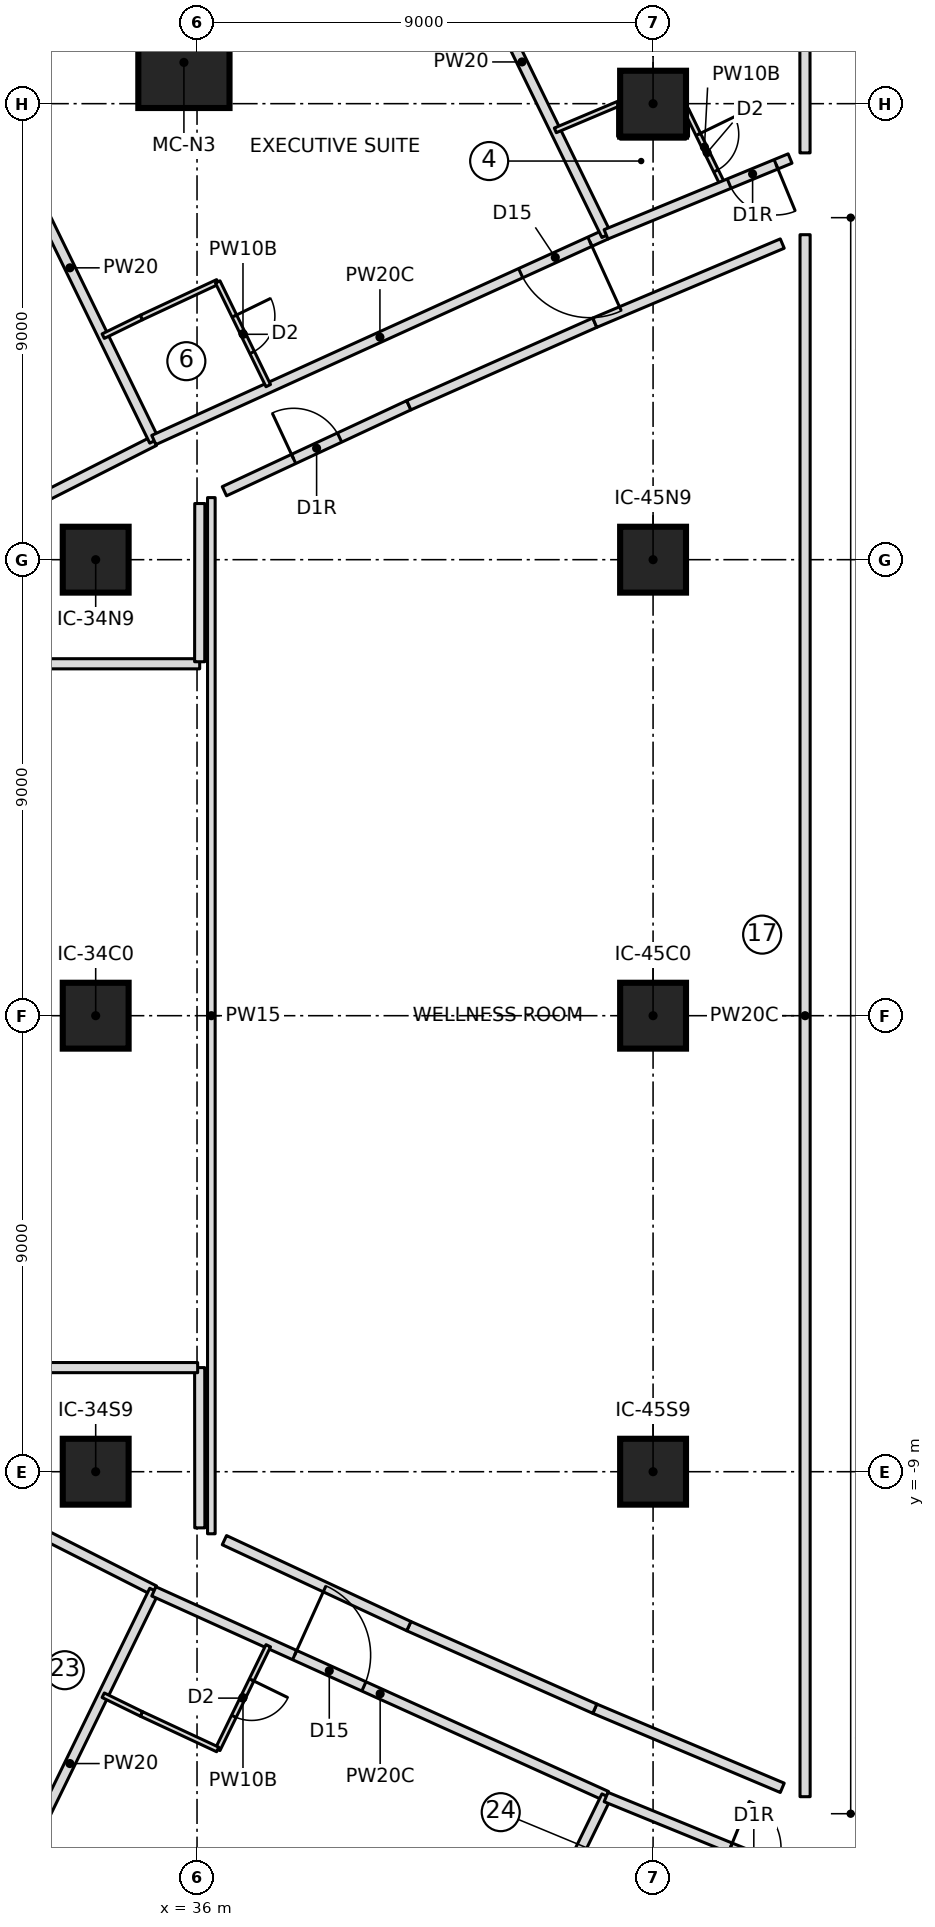
"""IFC4 building model, lengths in metres.
Left out: names, types, materials, properties, quantities, classifications, styles, units other than length and angle.
Written with IfcOpenShell. Run it as: python <this file> out.ifc"""

import sys

from ifc_helpers import new_model, si_unit, direction, frame, frame_2d, origin, origin_2d, place, context, subcontext, project, spatial, rectangle, extrude, element, fill, save


model = new_model("IFC4")
c1 = context("Model", 3, precision=1e-05, world=origin(), true_north=direction((0.0, 1.0)))
c2 = subcontext(c1, "Body", "Model", "MODEL_VIEW")
j1 = project(units=[si_unit("LENGTHUNIT", "METRE"), si_unit("PLANEANGLEUNIT", "RADIAN")], contexts=[c1])
p1 = place(None, origin())
s1 = spatial("IfcSite", under=j1, at=p1, CompositionType="ELEMENT")
p2 = place(p1, origin())
s2 = spatial("IfcBuilding", under=s1, at=p2, CompositionType="ELEMENT")
p3 = place(p2, frame((0.0, 0.0, 57.35)))
s3 = spatial("IfcBuildingStorey", under=s2, at=p3, CompositionType="ELEMENT", Elevation=57.35)
p4 = place(p3, frame((35.741, 18.814, 0.0), z_axis=(0.0, 0.0, 1.0), x_axis=(1.0, 0.0, 0.0)))
e1 = element("IfcColumn", 1, at=p4, inside=s3, PredefinedType="COLUMN", context=c2, shape_type="SweptSolid", body=[
    extrude(rectangle(XDim=1.8, YDim=1.8, at=origin_2d()), origin(), (0.0, 0.0, 1.0), 3.55),
])
for number, where, z_axis, x_axis in (
    (2, (34.0, -9.0, 0.0), (0.0, 0.0, 1.0), (1.0, 0.0, 0.0)),
    (3, (34.0, 0.0, 0.0), (0.0, 0.0, 1.0), (1.0, 0.0, 0.0)),
    (4, (34.0, 9.0, 0.0), (0.0, 0.0, 1.0), (1.0, 0.0, 0.0)),
    (5, (45.0, -9.0, 0.0), (0.0, 0.0, 1.0), (1.0, 0.0, 0.0)),
    (6, (45.0, 0.0, 0.0), (0.0, 0.0, 1.0), (1.0, 0.0, 0.0)),
    (7, (45.0, 9.0, 0.0), (0.0, 0.0, 1.0), (1.0, 0.0, 0.0)),
    (8, (45.0, 18.0, 0.0), (0.0, 0.0, 1.0), (1.0, 0.0, 0.0)),
):
    element("IfcColumn", number, at=place(p3, frame(where, z_axis=z_axis, x_axis=x_axis)), inside=s3, PredefinedType="COLUMN", context=c2, shape_type="SweptSolid", body=[
        extrude(rectangle(XDim=1.3, YDim=1.3, at=origin_2d()), origin(), (0.0, 0.0, 1.0), 3.55),
    ])
p5 = place(p3, frame((26.417, 6.908, 0.0), z_axis=(0.0, 0.0, 1.0), x_axis=(0.891700643128, 0.452625632334, 0.0)))
e9 = element("IfcWall", 9, at=p5, inside=s3, PredefinedType="PARTITIONING", context=c2, shape_type="SweptSolid", body=[
    extrude(rectangle(XDim=9.801, YDim=0.2, at=frame_2d((4.901, 0.0))), origin(), (0.0, 0.0, 1.0), 3.25),
])
p6 = place(p5, frame((3.7, 0.0, 0.0)))
e10 = element("IfcOpeningElement", 10, at=p6, cuts=e9, PredefinedType="OPENING", context=c2, shape_type="SweptSolid", body=[
    extrude(rectangle(XDim=1.0, YDim=2.1, at=frame_2d((0.5, 1.05))), frame((0.0, 0.11, 0.0), z_axis=(0.0, -1.0, 0.0), x_axis=(1.0, 0.0, 0.0)), (0.0, 0.0, 1.0), 0.22),
])
p7 = place(p3, frame((35.156, 11.344, 0.0), z_axis=(0.0, 0.0, 1.0), x_axis=(-0.438196407286, 0.898879251425, 0.0)))
e11 = element("IfcWall", 11, at=p7, inside=s3, PredefinedType="PARTITIONING", context=c2, shape_type="SweptSolid", body=[
    extrude(rectangle(XDim=7.6, YDim=0.2, at=frame_2d((3.8, 0.0))), origin(), (0.0, 0.0, 1.0), 3.25),
])
p8 = place(p3, frame((44.072, 15.421, 0.0), z_axis=(0.0, 0.0, 1.0), x_axis=(-0.910287143541, -0.413977434534, 0.0)))
e12 = element("IfcWall", 12, at=p8, inside=s3, PredefinedType="PARTITIONING", context=c2, shape_type="SweptSolid", body=[
    extrude(rectangle(XDim=9.803, YDim=0.2, at=frame_2d((4.902, 0.0))), origin(), (0.0, 0.0, 1.0), 3.25),
])
p9 = place(p8, frame((0.35, 0.0, 0.0)))
e13 = element("IfcOpeningElement", 13, at=p9, cuts=e12, PredefinedType="OPENING", context=c2, shape_type="SweptSolid", body=[
    extrude(rectangle(XDim=1.5, YDim=2.1, at=frame_2d((0.75, 1.05))), frame((0.0, 0.11, 0.0), z_axis=(0.0, -1.0, 0.0), x_axis=(1.0, 0.0, 0.0)), (0.0, 0.0, 1.0), 0.22),
])
p10 = place(p3, frame((34.148, 13.412, 0.0), z_axis=(0.0, 0.0, 1.0), x_axis=(0.89828999443, 0.43940310184, 0.0)))
e14 = element("IfcWall", 14, at=p10, inside=s3, PredefinedType="PARTITIONING", context=c2, shape_type="SweptSolid", body=[
    extrude(rectangle(XDim=0.84, YDim=0.1, at=frame_2d((0.42, 0.0))), origin(), (0.0, 0.0, 1.0), 3.25),
])
p11 = place(p3, frame((34.903, 13.781, 0.0), z_axis=(0.0, 0.0, 1.0), x_axis=(0.906434605418, 0.422346192242, 0.0)))
e15 = element("IfcWall", 15, at=p11, inside=s3, PredefinedType="PARTITIONING", context=c2, shape_type="SweptSolid", body=[
    extrude(rectangle(XDim=1.661, YDim=0.1, at=frame_2d((0.83, 0.0))), origin(), (0.0, 0.0, 1.0), 3.25),
])
p12 = place(p3, frame((36.408, 14.482, 0.0), z_axis=(0.0, 0.0, 1.0), x_axis=(0.438271544149, -0.898842618921, 0.0)))
e16 = element("IfcWall", 16, at=p12, inside=s3, PredefinedType="PARTITIONING", context=c2, shape_type="SweptSolid", body=[
    extrude(rectangle(XDim=2.277, YDim=0.1, at=frame_2d((1.139, 0.0))), origin(), (0.0, 0.0, 1.0), 3.25),
])
p13 = place(p12, frame((0.75, 0.0, 0.0)))
e17 = element("IfcOpeningElement", 17, at=p13, cuts=e16, PredefinedType="OPENING", context=c2, shape_type="SweptSolid", body=[
    extrude(rectangle(XDim=0.8, YDim=2.1, at=frame_2d((0.4, 1.05))), frame((0.0, 0.06, 0.0), z_axis=(0.0, -1.0, 0.0), x_axis=(1.0, 0.0, 0.0)), (0.0, 0.0, 1.0), 0.12),
])
p14 = place(p3, frame((44.08, 15.403, 0.0), z_axis=(0.0, 0.0, 1.0), x_axis=(-0.438196739796, 0.898879089328, 0.0)))
e18 = element("IfcWall", 18, at=p14, inside=s3, PredefinedType="PARTITIONING", context=c2, shape_type="SweptSolid", body=[
    extrude(rectangle(XDim=7.611, YDim=0.2, at=frame_2d((3.806, 0.0))), origin(), (0.0, 0.0, 1.0), 3.25),
])
p15 = place(p3, frame((43.071, 17.473, 0.0), z_axis=(0.0, 0.0, 1.0), x_axis=(0.921313965742, 0.388819465214, 0.0)))
e19 = element("IfcWall", 19, at=p15, inside=s3, PredefinedType="PARTITIONING", context=c2, shape_type="SweptSolid", body=[
    extrude(rectangle(XDim=1.388, YDim=0.1, at=frame_2d((0.694, 0.0))), origin(), (0.0, 0.0, 1.0), 3.25),
])
p16 = place(p3, frame((44.35, 18.013, 0.0), z_axis=(0.0, 0.0, 1.0), x_axis=(0.0, -1.0, 0.0)))
e20 = element("IfcWall", 20, at=p16, inside=s3, PredefinedType="PARTITIONING", context=c2, shape_type="SweptSolid", body=[
    extrude(rectangle(XDim=0.661, YDim=0.1, at=frame_2d((0.331, 0.0))), origin(), (0.0, 0.0, 1.0), 3.25),
])
p17 = place(p3, frame((44.352, 17.35, 0.0), z_axis=(0.0, 0.0, 1.0), x_axis=(1.0, 0.0, 0.0)))
e21 = element("IfcWall", 21, at=p17, inside=s3, PredefinedType="PARTITIONING", context=c2, shape_type="SweptSolid", body=[
    extrude(rectangle(XDim=1.296, YDim=0.1, at=frame_2d((0.648, 0.0))), origin(), (0.0, 0.0, 1.0), 3.25),
])
p18 = place(p3, frame((45.65, 17.352, 0.0), z_axis=(0.0, 0.0, 1.0), x_axis=(0.0, 1.0, 0.0)))
e22 = element("IfcWall", 22, at=p18, inside=s3, PredefinedType="PARTITIONING", context=c2, shape_type="SweptSolid", body=[
    extrude(rectangle(XDim=0.536, YDim=0.1, at=frame_2d((0.268, 0.0))), origin(), (0.0, 0.0, 1.0), 3.25),
])
p19 = place(p3, frame((45.65, 17.888, 0.0), z_axis=(0.0, 0.0, 1.0), x_axis=(0.438301838547, -0.89882784688, 0.0)))
e23 = element("IfcWall", 23, at=p19, inside=s3, PredefinedType="PARTITIONING", context=c2, shape_type="SweptSolid", body=[
    extrude(rectangle(XDim=1.659, YDim=0.1, at=frame_2d((0.829, 0.0))), origin(), (0.0, 0.0, 1.0), 3.25),
])
p20 = place(p19, frame((0.55, 0.0, 0.0)))
e24 = element("IfcOpeningElement", 24, at=p20, cuts=e23, PredefinedType="OPENING", context=c2, shape_type="SweptSolid", body=[
    extrude(rectangle(XDim=0.8, YDim=2.1, at=frame_2d((0.4, 1.05))), frame((0.0, 0.06, 0.0), z_axis=(0.0, -1.0, 0.0), x_axis=(1.0, 0.0, 0.0)), (0.0, 0.0, 1.0), 0.12),
])
p21 = place(p3, frame((26.417, -6.908, 0.0), z_axis=(0.0, 0.0, 1.0), x_axis=(0.891700643128, -0.452625632334, 0.0)))
e25 = element("IfcWall", 25, at=p21, inside=s3, PredefinedType="PARTITIONING", context=c2, shape_type="SweptSolid", body=[
    extrude(rectangle(XDim=9.801, YDim=0.2, at=frame_2d((4.901, 0.0))), origin(), (0.0, 0.0, 1.0), 3.25),
])
p22 = place(p21, frame((3.7, 0.0, 0.0)))
e26 = element("IfcOpeningElement", 26, at=p22, cuts=e25, PredefinedType="OPENING", context=c2, shape_type="SweptSolid", body=[
    extrude(rectangle(XDim=1.0, YDim=2.1, at=frame_2d((0.5, 1.05))), frame((0.0, 0.11, 0.0), z_axis=(0.0, -1.0, 0.0), x_axis=(1.0, 0.0, 0.0)), (0.0, 0.0, 1.0), 0.22),
])
p23 = place(p3, frame((31.826, -18.176, 0.0), z_axis=(0.0, 0.0, 1.0), x_axis=(0.438196407286, 0.898879251425, 0.0)))
e27 = element("IfcWall", 27, at=p23, inside=s3, PredefinedType="PARTITIONING", context=c2, shape_type="SweptSolid", body=[
    extrude(rectangle(XDim=7.6, YDim=0.2, at=frame_2d((3.8, 0.0))), origin(), (0.0, 0.0, 1.0), 3.25),
])
p24 = place(p3, frame((35.148, -11.362, 0.0), z_axis=(0.0, 0.0, 1.0), x_axis=(0.9111333041, -0.412111759308, 0.0)))
e28 = element("IfcWall", 28, at=p24, inside=s3, PredefinedType="PARTITIONING", context=c2, shape_type="SweptSolid", body=[
    extrude(rectangle(XDim=9.804, YDim=0.2, at=frame_2d((4.902, 0.0))), origin(), (0.0, 0.0, 1.0), 3.25),
])
p25 = place(p24, frame((3.05, 0.0, 0.0)))
e29 = element("IfcOpeningElement", 29, at=p25, cuts=e28, PredefinedType="OPENING", context=c2, shape_type="SweptSolid", body=[
    extrude(rectangle(XDim=1.5, YDim=2.1, at=frame_2d((0.75, 1.05))), frame((0.0, 0.11, 0.0), z_axis=(0.0, -1.0, 0.0), x_axis=(1.0, 0.0, 0.0)), (0.0, 0.0, 1.0), 0.22),
])
p26 = place(p3, frame((37.406, -12.435, 0.0), z_axis=(0.0, 0.0, 1.0), x_axis=(-0.438271544149, -0.898842618921, 0.0)))
e30 = element("IfcWall", 30, at=p26, inside=s3, PredefinedType="PARTITIONING", context=c2, shape_type="SweptSolid", body=[
    extrude(rectangle(XDim=2.277, YDim=0.1, at=frame_2d((1.139, 0.0))), origin(), (0.0, 0.0, 1.0), 3.25),
])
p27 = place(p26, frame((0.75, 0.0, 0.0)))
e31 = element("IfcOpeningElement", 31, at=p27, cuts=e30, PredefinedType="OPENING", context=c2, shape_type="SweptSolid", body=[
    extrude(rectangle(XDim=0.8, YDim=2.1, at=frame_2d((0.4, 1.05))), frame((0.0, 0.06, 0.0), z_axis=(0.0, -1.0, 0.0), x_axis=(1.0, 0.0, 0.0)), (0.0, 0.0, 1.0), 0.12),
])
p28 = place(p3, frame((36.408, -14.482, 0.0), z_axis=(0.0, 0.0, 1.0), x_axis=(-0.906434605418, 0.422346192242, 0.0)))
e32 = element("IfcWall", 32, at=p28, inside=s3, PredefinedType="PARTITIONING", context=c2, shape_type="SweptSolid", body=[
    extrude(rectangle(XDim=1.661, YDim=0.1, at=frame_2d((0.83, 0.0))), origin(), (0.0, 0.0, 1.0), 3.25),
])
p29 = place(p3, frame((34.903, -13.781, 0.0), z_axis=(0.0, 0.0, 1.0), x_axis=(-0.89828999443, 0.43940310184, 0.0)))
e33 = element("IfcWall", 33, at=p29, inside=s3, PredefinedType="PARTITIONING", context=c2, shape_type="SweptSolid", body=[
    extrude(rectangle(XDim=0.84, YDim=0.1, at=frame_2d((0.42, 0.0))), origin(), (0.0, 0.0, 1.0), 3.25),
])
p30 = place(p3, frame((40.745, -22.244, 0.0), z_axis=(0.0, 0.0, 1.0), x_axis=(0.438196739796, 0.898879089328, 0.0)))
e34 = element("IfcWall", 34, at=p30, inside=s3, PredefinedType="PARTITIONING", context=c2, shape_type="SweptSolid", body=[
    extrude(rectangle(XDim=7.611, YDim=0.2, at=frame_2d((3.806, 0.0))), origin(), (0.0, 0.0, 1.0), 3.25),
])
p31 = place(p3, frame((46.377, -16.397, 0.0), z_axis=(0.0, 0.0, 1.0), x_axis=(-0.438301838547, -0.89882784688, 0.0)))
e35 = element("IfcWall", 35, at=p31, inside=s3, PredefinedType="PARTITIONING", context=c2, shape_type="SweptSolid", body=[
    extrude(rectangle(XDim=1.659, YDim=0.1, at=frame_2d((0.829, 0.0))), origin(), (0.0, 0.0, 1.0), 3.25),
])
p32 = place(p31, frame((0.25, 0.0, 0.0)))
e36 = element("IfcOpeningElement", 36, at=p32, cuts=e35, PredefinedType="OPENING", context=c2, shape_type="SweptSolid", body=[
    extrude(rectangle(XDim=0.8, YDim=2.1, at=frame_2d((0.4, 1.05))), frame((0.0, 0.06, 0.0), z_axis=(0.0, -1.0, 0.0), x_axis=(1.0, 0.0, 0.0)), (0.0, 0.0, 1.0), 0.12),
])
p33 = place(p3, frame((36.283, -10.225, 0.0), z_axis=(0.0, 0.0, 1.0), x_axis=(0.0, 1.0, 0.0)))
e37 = element("IfcWall", 37, at=p33, inside=s3, PredefinedType="PARTITIONING", context=c2, shape_type="SweptSolid", body=[
    extrude(rectangle(XDim=20.45, YDim=0.15, at=frame_2d((10.225, 0.0))), origin(), (0.0, 0.0, 1.0), 3.25),
])
p34 = place(p3, frame((36.54, 10.351, 0.0), z_axis=(0.0, 0.0, 1.0), x_axis=(0.906347708834, 0.42253263861, 0.0)))
e38 = element("IfcWall", 38, at=p34, inside=s3, PredefinedType="PARTITIONING", context=c2, shape_type="SweptSolid", body=[
    extrude(rectangle(XDim=4.016, YDim=0.2, at=frame_2d((2.008, 0.0))), origin(), (0.0, 0.0, 1.0), 3.25),
])
p35 = place(p34, frame((1.508, 0.0, 0.0)))
e39 = element("IfcOpeningElement", 39, at=p35, cuts=e38, PredefinedType="OPENING", context=c2, shape_type="SweptSolid", body=[
    extrude(rectangle(XDim=1.0, YDim=2.1, at=frame_2d((0.5, 1.05))), frame((0.0, 0.11, 0.0), z_axis=(0.0, -1.0, 0.0), x_axis=(1.0, 0.0, 0.0)), (0.0, 0.0, 1.0), 0.22),
])
p36 = place(p3, frame((40.18, 12.048, 0.0), z_axis=(0.0, 0.0, 1.0), x_axis=(0.913986953061, 0.405743576209, 0.0)))
e40 = element("IfcWall", 40, at=p36, inside=s3, PredefinedType="PARTITIONING", context=c2, shape_type="SweptSolid", body=[
    extrude(rectangle(XDim=4.016, YDim=0.2, at=frame_2d((2.008, 0.0))), origin(), (0.0, 0.0, 1.0), 3.25),
])
for number, where, z_axis, x_axis in (
    (41, (43.85, 13.677, 0.0), (0.0, 0.0, 1.0), (0.921, 0.389, 0.0)),
    (42, (47.55, -15.239, 0.0), (0.0, 0.0, 1.0), (-0.921, 0.389, 0.0)),
):
    element("IfcWall", number, at=place(p3, frame(where, z_axis=z_axis, x_axis=x_axis)), inside=s3, PredefinedType="PARTITIONING", context=c2, shape_type="SweptSolid", body=[
        extrude(rectangle(XDim=4.016, YDim=0.2, at=frame_2d((2.008, 0.0))), origin(), (0.0, 0.0, 1.0), 3.25),
    ])
p37 = place(p3, frame((43.85, -13.677, 0.0), z_axis=(0.0, 0.0, 1.0), x_axis=(-0.913986953061, 0.405743576209, 0.0)))
e43 = element("IfcWall", 43, at=p37, inside=s3, PredefinedType="PARTITIONING", context=c2, shape_type="SweptSolid", body=[
    extrude(rectangle(XDim=4.016, YDim=0.2, at=frame_2d((2.008, 0.0))), origin(), (0.0, 0.0, 1.0), 3.25),
])
p38 = place(p3, frame((40.18, -12.048, 0.0), z_axis=(0.0, 0.0, 1.0), x_axis=(-0.906347708834, 0.42253263861, 0.0)))
e44 = element("IfcWall", 44, at=p38, inside=s3, PredefinedType="PARTITIONING", context=c2, shape_type="SweptSolid", body=[
    extrude(rectangle(XDim=4.016, YDim=0.2, at=frame_2d((2.008, 0.0))), origin(), (0.0, 0.0, 1.0), 3.25),
])
p39 = place(p3, frame((47.704, 16.917, 0.0), z_axis=(0.0, 0.0, 1.0), x_axis=(-0.924573816857, -0.381002962169, 0.0)))
e45 = element("IfcWall", 45, at=p39, inside=s3, PredefinedType="PARTITIONING", context=c2, shape_type="SweptSolid", body=[
    extrude(rectangle(XDim=3.929, YDim=0.2, at=frame_2d((1.964, 0.0))), origin(), (0.0, 0.0, 1.0), 3.25),
])
p40 = place(p39, frame((0.3, 0.0, 0.0)))
e46 = element("IfcOpeningElement", 46, at=p40, cuts=e45, PredefinedType="OPENING", context=c2, shape_type="SweptSolid", body=[
    extrude(rectangle(XDim=1.0, YDim=2.1, at=frame_2d((0.5, 1.05))), frame((0.0, 0.11, 0.0), z_axis=(0.0, -1.0, 0.0), x_axis=(1.0, 0.0, 0.0)), (0.0, 0.0, 1.0), 0.22),
])
p41 = place(p3, frame((44.072, -15.421, 0.0), z_axis=(0.0, 0.0, 1.0), x_axis=(0.925861862022, -0.377862160653, 0.0)))
e47 = element("IfcWall", 47, at=p41, inside=s3, PredefinedType="PARTITIONING", context=c2, shape_type="SweptSolid", body=[
    extrude(rectangle(XDim=3.923, YDim=0.2, at=frame_2d((1.961, 0.0))), origin(), (0.0, 0.0, 1.0), 3.25),
])
p42 = place(p41, frame((2.65, 0.0, 0.0)))
e48 = element("IfcOpeningElement", 48, at=p42, cuts=e47, PredefinedType="OPENING", context=c2, shape_type="SweptSolid", body=[
    extrude(rectangle(XDim=1.0, YDim=2.1, at=frame_2d((0.5, 1.05))), frame((0.0, 0.11, 0.0), z_axis=(0.0, -1.0, 0.0), x_axis=(1.0, 0.0, 0.0)), (0.0, 0.0, 1.0), 0.22),
])
p43 = place(p3, frame((36.055, -10.108, 0.0), z_axis=(0.0, 0.0, 1.0), x_axis=(-0.00077190251, 0.999999702083, 0.0)))
e49 = element("IfcWall", 49, at=p43, inside=s3, PredefinedType="PARTITIONING", context=c2, shape_type="SweptSolid", body=[
    extrude(rectangle(XDim=3.163, YDim=0.2, at=frame_2d((1.582, 0.0))), origin(), (0.0, 0.0, 1.0), 3.25),
])
for number, where, z_axis, x_axis in (
    (50, (36.012, -6.946, 0.0), (0.0, 0.0, 1.0), (-1.0, 6.007e-05, 0.0)),
    (51, (31.989, 6.945, 0.0), (0.0, 0.0, 1.0), (1.0, 6.007e-05, 0.0)),
):
    element("IfcWall", number, at=place(p3, frame(where, z_axis=z_axis, x_axis=x_axis)), inside=s3, PredefinedType="PARTITIONING", context=c2, shape_type="SweptSolid", body=[
        extrude(rectangle(XDim=4.064, YDim=0.2, at=frame_2d((2.032, 0.0))), origin(), (0.0, 0.0, 1.0), 3.25),
    ])
p44 = place(p3, frame((36.052, 6.986, 0.0), z_axis=(0.0, 0.0, 1.0), x_axis=(0.000781799464, 0.999999694395, 0.0)))
e52 = element("IfcWall", 52, at=p44, inside=s3, PredefinedType="PARTITIONING", context=c2, shape_type="SweptSolid", body=[
    extrude(rectangle(XDim=3.123, YDim=0.2, at=frame_2d((1.562, 0.0))), origin(), (0.0, 0.0, 1.0), 3.25),
])
p45 = place(p3, frame((48.0, 15.414, 0.0), z_axis=(0.0, 0.0, 1.0), x_axis=(0.0, -1.0, 0.0)))
e53 = element("IfcWall", 53, at=p45, inside=s3, PredefinedType="PARTITIONING", context=c2, shape_type="SweptSolid", body=[
    extrude(rectangle(XDim=30.828, YDim=0.2, at=frame_2d((15.414, 0.0))), origin(), (0.0, 0.0, 1.0), 3.25),
])
p46 = place(p3, frame((47.996, 20.683, 0.0), z_axis=(0.0, 0.0, 1.0), x_axis=(0.000801763623, -0.999999678587, 0.0)))
e54 = element("IfcWall", 54, at=p46, inside=s3, PredefinedType="PARTITIONING", context=c2, shape_type="SweptSolid", body=[
    extrude(rectangle(XDim=3.654, YDim=0.2, at=frame_2d((1.827, 0.0))), origin(), (0.0, 0.0, 1.0), 3.25),
])
p47 = place(p13, origin())
e55 = element("IfcDoor", 55, at=p47, inside=s3, OperationType="SINGLE_SWING_LEFT", PredefinedType="DOOR", context=c2, shape_type="SweptSolid", body=[
    extrude(rectangle(XDim=0.8, YDim=2.1, at=frame_2d((0.4, 1.05))), frame((0.0, 0.025, 0.0), z_axis=(0.0, -1.0, 0.0), x_axis=(1.0, 0.0, 0.0)), (0.0, 0.0, 1.0), 0.05),
])
fill(e17, e55)
p48 = place(p9, origin())
e56 = element("IfcDoor", 56, at=p48, inside=s3, OperationType="DOUBLE_DOOR_SINGLE_SWING", PredefinedType="DOOR", context=c2, shape_type="SweptSolid", body=[
    extrude(rectangle(XDim=1.5, YDim=2.1, at=frame_2d((0.75, 1.05))), frame((0.0, 0.025, 0.0), z_axis=(0.0, -1.0, 0.0), x_axis=(1.0, 0.0, 0.0)), (0.0, 0.0, 1.0), 0.05),
])
fill(e13, e56)
p49 = place(p20, origin())
e57 = element("IfcDoor", 57, at=p49, inside=s3, OperationType="SINGLE_SWING_LEFT", PredefinedType="DOOR", context=c2, shape_type="SweptSolid", body=[
    extrude(rectangle(XDim=0.8, YDim=2.1, at=frame_2d((0.4, 1.05))), frame((0.0, 0.025, 0.0), z_axis=(0.0, -1.0, 0.0), x_axis=(1.0, 0.0, 0.0)), (0.0, 0.0, 1.0), 0.05),
])
fill(e24, e57)
p50 = place(p40, origin())
e58 = element("IfcDoor", 58, at=p50, inside=s3, OperationType="SINGLE_SWING_RIGHT", PredefinedType="DOOR", context=c2, shape_type="SweptSolid", body=[
    extrude(rectangle(XDim=1.0, YDim=2.1, at=frame_2d((0.5, 1.05))), frame((0.0, 0.025, 0.0), z_axis=(0.0, -1.0, 0.0), x_axis=(1.0, 0.0, 0.0)), (0.0, 0.0, 1.0), 0.05),
])
fill(e46, e58)
p51 = place(p27, origin())
e59 = element("IfcDoor", 59, at=p51, inside=s3, OperationType="SINGLE_SWING_LEFT", PredefinedType="DOOR", context=c2, shape_type="SweptSolid", body=[
    extrude(rectangle(XDim=0.8, YDim=2.1, at=frame_2d((0.4, 1.05))), frame((0.0, 0.025, 0.0), z_axis=(0.0, -1.0, 0.0), x_axis=(1.0, 0.0, 0.0)), (0.0, 0.0, 1.0), 0.05),
])
fill(e31, e59)
p52 = place(p25, origin())
e60 = element("IfcDoor", 60, at=p52, inside=s3, OperationType="DOUBLE_DOOR_SINGLE_SWING", PredefinedType="DOOR", context=c2, shape_type="SweptSolid", body=[
    extrude(rectangle(XDim=1.5, YDim=2.1, at=frame_2d((0.75, 1.05))), frame((0.0, 0.025, 0.0), z_axis=(0.0, -1.0, 0.0), x_axis=(1.0, 0.0, 0.0)), (0.0, 0.0, 1.0), 0.05),
])
fill(e29, e60)
p53 = place(p42, origin())
e61 = element("IfcDoor", 61, at=p53, inside=s3, OperationType="SINGLE_SWING_RIGHT", PredefinedType="DOOR", context=c2, shape_type="SweptSolid", body=[
    extrude(rectangle(XDim=1.0, YDim=2.1, at=frame_2d((0.5, 1.05))), frame((0.0, 0.025, 0.0), z_axis=(0.0, -1.0, 0.0), x_axis=(1.0, 0.0, 0.0)), (0.0, 0.0, 1.0), 0.05),
])
fill(e48, e61)
p54 = place(p35, origin())
e62 = element("IfcDoor", 62, at=p54, inside=s3, OperationType="SINGLE_SWING_RIGHT", PredefinedType="DOOR", context=c2, shape_type="SweptSolid", body=[
    extrude(rectangle(XDim=1.0, YDim=2.1, at=frame_2d((0.5, 1.05))), frame((0.0, 0.025, 0.0), z_axis=(0.0, -1.0, 0.0), x_axis=(1.0, 0.0, 0.0)), (0.0, 0.0, 1.0), 0.05),
])
fill(e39, e62)
save(model, sys.argv[1])
